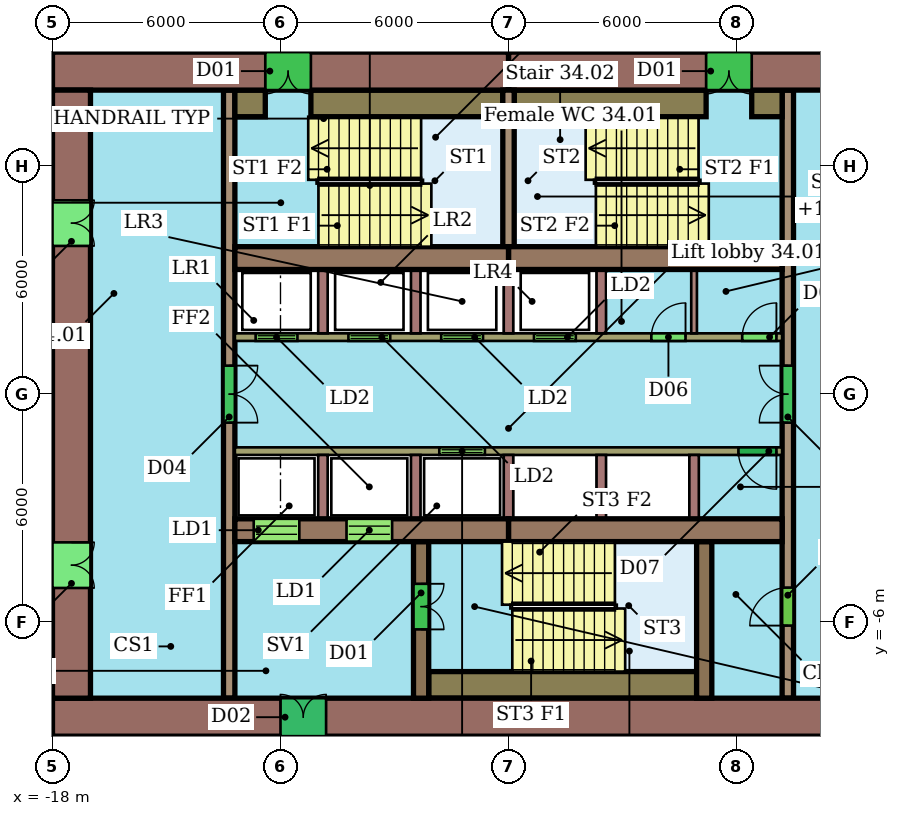
"""IFC4 building model, lengths in metres.
Left out: names, types, materials, properties, quantities, classifications, styles, units other than length and angle.
Written with IfcOpenShell. Run it as: python <this file> out.ifc"""

import sys

from ifc_helpers import new_model, si_unit, direction, frame, frame_2d, origin, place, context, subcontext, project, spatial, rectangle, extrude, element, fill, save


model = new_model("IFC4")
c1 = context("Model", 3, precision=1e-05, world=origin(), true_north=direction((0.0, 1.0)))
c2 = subcontext(c1, "Body", "Model", "MODEL_VIEW")
j1 = project(units=[si_unit("LENGTHUNIT", "METRE"), si_unit("PLANEANGLEUNIT", "RADIAN")], contexts=[c1])
p1 = place(None, origin())
s1 = spatial("IfcSite", under=j1, at=p1, CompositionType="ELEMENT")
p2 = place(p1, origin())
s2 = spatial("IfcBuilding", under=s1, at=p2, CompositionType="ELEMENT")
p3 = place(p2, frame((0.0, 0.0, 147.0)))
s3 = spatial("IfcBuildingStorey", under=s2, at=p3, CompositionType="ELEMENT", Elevation=147.0)
p4 = place(p3, frame((6.0, 8.5, 0.0), z_axis=(0.0, 0.0, 1.0), x_axis=(-1.0, 0.0, 0.0)))
e1 = element("IfcWall", 1, at=p4, inside=s3, PredefinedType="SHEAR", context=c2, shape_type="SweptSolid", body=[
    extrude(rectangle(XDim=12.0, YDim=1.0, at=frame_2d((6.0, 0.0))), origin(), (0.0, 0.0, 1.0), 3.3),
])
p5 = place(p4, frame((5.6, 0.0, 0.0)))
e2 = element("IfcOpeningElement", 2, at=p5, cuts=e1, PredefinedType="OPENING", context=c2, shape_type="SweptSolid", body=[
    extrude(rectangle(XDim=1.2, YDim=2.1, at=frame_2d((0.6, 1.05))), frame((0.0, 0.51, 0.0), z_axis=(0.0, -1.0, 0.0), x_axis=(1.0, 0.0, 0.0)), (0.0, 0.0, 1.0), 1.02),
])
p6 = place(p3, frame((-6.0, 8.5, 0.0), z_axis=(0.0, 0.0, 1.0), x_axis=(-1.0, 0.0, 0.0)))
e3 = element("IfcWall", 3, at=p6, inside=s3, PredefinedType="SHEAR", context=c2, shape_type="SweptSolid", body=[
    extrude(rectangle(XDim=12.0, YDim=1.0, at=frame_2d((6.0, 0.0))), origin(), (0.0, 0.0, 1.0), 3.3),
])
p7 = place(p6, frame((5.2, 0.0, 0.0)))
e4 = element("IfcOpeningElement", 4, at=p7, cuts=e3, PredefinedType="OPENING", context=c2, shape_type="SweptSolid", body=[
    extrude(rectangle(XDim=1.2, YDim=2.1, at=frame_2d((0.6, 1.05))), frame((0.0, 0.51, 0.0), z_axis=(0.0, -1.0, 0.0), x_axis=(1.0, 0.0, 0.0)), (0.0, 0.0, 1.0), 1.02),
])
p8 = place(p3, frame((-18.0, -8.5, 0.0), z_axis=(0.0, 0.0, 1.0), x_axis=(1.0, 0.0, 0.0)))
e5 = element("IfcWall", 5, at=p8, inside=s3, PredefinedType="SHEAR", context=c2, shape_type="SweptSolid", body=[
    extrude(rectangle(XDim=24.0, YDim=1.0, at=frame_2d((12.0, 0.0))), origin(), (0.0, 0.0, 1.0), 3.3),
])
p9 = place(p8, frame((6.0, 0.0, 0.0)))
e6 = element("IfcOpeningElement", 6, at=p9, cuts=e5, PredefinedType="OPENING", context=c2, shape_type="SweptSolid", body=[
    extrude(rectangle(XDim=1.2, YDim=2.1, at=frame_2d((0.6, 1.05))), frame((0.0, 0.51, 0.0), z_axis=(0.0, -1.0, 0.0), x_axis=(1.0, 0.0, 0.0)), (0.0, 0.0, 1.0), 1.02),
])
p10 = place(p3, frame((-17.5, 8.0, 0.0), z_axis=(0.0, 0.0, 1.0), x_axis=(0.0, -1.0, 0.0)))
e7 = element("IfcWall", 7, at=p10, inside=s3, PredefinedType="SHEAR", context=c2, shape_type="SweptSolid", body=[
    extrude(rectangle(XDim=16.0, YDim=1.0, at=frame_2d((8.0, 0.0))), origin(), (0.0, 0.0, 1.0), 3.3),
])
p11 = place(p10, frame((11.9, 0.0, 0.0)))
e8 = element("IfcOpeningElement", 8, at=p11, cuts=e7, PredefinedType="OPENING", context=c2, shape_type="SweptSolid", body=[
    extrude(rectangle(XDim=1.2, YDim=2.1, at=frame_2d((0.6, 1.05))), frame((0.0, 0.51, 0.0), z_axis=(0.0, -1.0, 0.0), x_axis=(1.0, 0.0, 0.0)), (0.0, 0.0, 1.0), 1.02),
])
p12 = place(p10, frame((2.9, 0.0, 0.0)))
e9 = element("IfcOpeningElement", 9, at=p12, cuts=e7, PredefinedType="OPENING", context=c2, shape_type="SweptSolid", body=[
    extrude(rectangle(XDim=1.2, YDim=2.1, at=frame_2d((0.6, 1.05))), frame((0.0, 0.51, 0.0), z_axis=(0.0, -1.0, 0.0), x_axis=(1.0, 0.0, 0.0)), (0.0, 0.0, 1.0), 1.02),
])
for number, where, z_axis, x_axis in (
    (10, (-13.2, 3.58, 0.0), (0.0, 0.0, 1.0), (1.0, 0.0, 0.0)),
    (11, (-6.0, 3.58, 0.0), (0.0, 0.0, 1.0), (1.0, 0.0, 0.0)),
):
    element("IfcWall", number, at=place(p3, frame(where, z_axis=z_axis, x_axis=x_axis)), inside=s3, PredefinedType="SHEAR", context=c2, shape_type="SweptSolid", body=[
        extrude(rectangle(XDim=7.2, YDim=0.6, at=frame_2d((3.6, 0.0))), origin(), (0.0, 0.0, 1.0), 3.3),
    ])
p13 = place(p3, frame((-13.2, -3.58, 0.0), z_axis=(0.0, 0.0, 1.0), x_axis=(1.0, 0.0, 0.0)))
e12 = element("IfcWall", 12, at=p13, inside=s3, PredefinedType="SHEAR", context=c2, shape_type="SweptSolid", body=[
    extrude(rectangle(XDim=7.2, YDim=0.6, at=frame_2d((3.6, 0.0))), origin(), (0.0, 0.0, 1.0), 3.3),
])
p14 = place(p13, frame((0.496, 0.0, 0.0)))
e13 = element("IfcOpeningElement", 13, at=p14, cuts=e12, PredefinedType="OPENING", context=c2, shape_type="SweptSolid", body=[
    extrude(rectangle(XDim=1.2, YDim=2.1, at=frame_2d((0.6, 1.05))), frame((0.0, 0.31, 0.0), z_axis=(0.0, -1.0, 0.0), x_axis=(1.0, 0.0, 0.0)), (0.0, 0.0, 1.0), 0.62),
])
p15 = place(p13, frame((2.938, 0.0, 0.0)))
e14 = element("IfcOpeningElement", 14, at=p15, cuts=e12, PredefinedType="OPENING", context=c2, shape_type="SweptSolid", body=[
    extrude(rectangle(XDim=1.2, YDim=2.1, at=frame_2d((0.6, 1.05))), frame((0.0, 0.31, 0.0), z_axis=(0.0, -1.0, 0.0), x_axis=(1.0, 0.0, 0.0)), (0.0, 0.0, 1.0), 0.62),
])
p16 = place(p3, frame((-6.0, -3.58, 0.0), z_axis=(0.0, 0.0, 1.0), x_axis=(1.0, 0.0, 0.0)))
e15 = element("IfcWall", 15, at=p16, inside=s3, PredefinedType="SHEAR", context=c2, shape_type="SweptSolid", body=[
    extrude(rectangle(XDim=7.2, YDim=0.6, at=frame_2d((3.6, 0.0))), origin(), (0.0, 0.0, 1.0), 3.3),
])
p17 = place(p3, frame((-13.35, 8.0, 0.0), z_axis=(0.0, 0.0, 1.0), x_axis=(0.0, -1.0, 0.0)))
e16 = element("IfcWall", 16, at=p17, inside=s3, PredefinedType="SHEAR", context=c2, shape_type="SweptSolid", body=[
    extrude(rectangle(XDim=16.0, YDim=0.3, at=frame_2d((8.0, 0.0))), origin(), (0.0, 0.0, 1.0), 3.3),
])
p18 = place(p17, frame((7.25, 0.0, 0.0)))
e17 = element("IfcOpeningElement", 17, at=p18, cuts=e16, PredefinedType="OPENING", context=c2, shape_type="SweptSolid", body=[
    extrude(rectangle(XDim=1.5, YDim=2.1, at=frame_2d((0.75, 1.05))), frame((0.0, 0.16, 0.0), z_axis=(0.0, -1.0, 0.0), x_axis=(1.0, 0.0, 0.0)), (0.0, 0.0, 1.0), 0.32),
])
p19 = place(p3, frame((1.35, -8.0, 0.0), z_axis=(0.0, 0.0, 1.0), x_axis=(0.0, 1.0, 0.0)))
e18 = element("IfcWall", 18, at=p19, inside=s3, PredefinedType="SHEAR", context=c2, shape_type="SweptSolid", body=[
    extrude(rectangle(XDim=16.0, YDim=0.3, at=frame_2d((8.0, 0.0))), origin(), (0.0, 0.0, 1.0), 3.3),
])
p20 = place(p19, frame((1.91, 0.0, 0.0)))
e19 = element("IfcOpeningElement", 19, at=p20, cuts=e18, PredefinedType="OPENING", context=c2, shape_type="SweptSolid", body=[
    extrude(rectangle(XDim=1.0, YDim=2.1, at=frame_2d((0.5, 1.05))), frame((0.0, 0.16, 0.0), z_axis=(0.0, -1.0, 0.0), x_axis=(1.0, 0.0, 0.0)), (0.0, 0.0, 1.0), 0.32),
])
p21 = place(p19, frame((7.25, 0.0, 0.0)))
e20 = element("IfcOpeningElement", 20, at=p21, cuts=e18, PredefinedType="OPENING", context=c2, shape_type="SweptSolid", body=[
    extrude(rectangle(XDim=1.5, YDim=2.1, at=frame_2d((0.75, 1.05))), frame((0.0, 0.16, 0.0), z_axis=(0.0, -1.0, 0.0), x_axis=(1.0, 0.0, 0.0)), (0.0, 0.0, 1.0), 0.32),
])
p22 = place(p3, frame((-13.2, 1.5, 0.0), z_axis=(0.0, 0.0, 1.0), x_axis=(1.0, 0.0, 0.0)))
e21 = element("IfcWall", 21, at=p22, inside=s3, PredefinedType="SHEAR", context=c2, shape_type="SweptSolid", body=[
    extrude(rectangle(XDim=14.4, YDim=0.2, at=frame_2d((7.2, 0.0))), origin(), (0.0, 0.0, 1.0), 3.3),
])
p23 = place(p22, frame((0.546, 0.0, 0.0)))
e22 = element("IfcOpeningElement", 22, at=p23, cuts=e21, PredefinedType="OPENING", context=c2, shape_type="SweptSolid", body=[
    extrude(rectangle(XDim=1.1, YDim=2.1, at=frame_2d((0.55, 1.05))), frame((0.0, 0.11, 0.0), z_axis=(0.0, -1.0, 0.0), x_axis=(1.0, 0.0, 0.0)), (0.0, 0.0, 1.0), 0.22),
])
p24 = place(p22, frame((2.988, 0.0, 0.0)))
e23 = element("IfcOpeningElement", 23, at=p24, cuts=e21, PredefinedType="OPENING", context=c2, shape_type="SweptSolid", body=[
    extrude(rectangle(XDim=1.1, YDim=2.1, at=frame_2d((0.55, 1.05))), frame((0.0, 0.11, 0.0), z_axis=(0.0, -1.0, 0.0), x_axis=(1.0, 0.0, 0.0)), (0.0, 0.0, 1.0), 0.22),
])
p25 = place(p22, frame((5.429, 0.0, 0.0)))
e24 = element("IfcOpeningElement", 24, at=p25, cuts=e21, PredefinedType="OPENING", context=c2, shape_type="SweptSolid", body=[
    extrude(rectangle(XDim=1.1, YDim=2.1, at=frame_2d((0.55, 1.05))), frame((0.0, 0.11, 0.0), z_axis=(0.0, -1.0, 0.0), x_axis=(1.0, 0.0, 0.0)), (0.0, 0.0, 1.0), 0.22),
])
p26 = place(p22, frame((7.871, 0.0, 0.0)))
e25 = element("IfcOpeningElement", 25, at=p26, cuts=e21, PredefinedType="OPENING", context=c2, shape_type="SweptSolid", body=[
    extrude(rectangle(XDim=1.1, YDim=2.1, at=frame_2d((0.55, 1.05))), frame((0.0, 0.11, 0.0), z_axis=(0.0, -1.0, 0.0), x_axis=(1.0, 0.0, 0.0)), (0.0, 0.0, 1.0), 0.22),
])
p27 = place(p22, frame((10.958, 0.0, 0.0)))
e26 = element("IfcOpeningElement", 26, at=p27, cuts=e21, PredefinedType="OPENING", context=c2, shape_type="SweptSolid", body=[
    extrude(rectangle(XDim=0.9, YDim=2.1, at=frame_2d((0.45, 1.05))), frame((0.0, 0.11, 0.0), z_axis=(0.0, -1.0, 0.0), x_axis=(1.0, 0.0, 0.0)), (0.0, 0.0, 1.0), 0.22),
])
p28 = place(p22, frame((13.35, 0.0, 0.0)))
e27 = element("IfcOpeningElement", 27, at=p28, cuts=e21, PredefinedType="OPENING", context=c2, shape_type="SweptSolid", body=[
    extrude(rectangle(XDim=0.9, YDim=2.1, at=frame_2d((0.45, 1.05))), frame((0.0, 0.11, 0.0), z_axis=(0.0, -1.0, 0.0), x_axis=(1.0, 0.0, 0.0)), (0.0, 0.0, 1.0), 0.22),
])
p29 = place(p3, frame((1.2, -1.5, 0.0), z_axis=(0.0, 0.0, 1.0), x_axis=(-1.0, 0.0, 0.0)))
e28 = element("IfcWall", 28, at=p29, inside=s3, PredefinedType="SHEAR", context=c2, shape_type="SweptSolid", body=[
    extrude(rectangle(XDim=14.4, YDim=0.2, at=frame_2d((7.2, 0.0))), origin(), (0.0, 0.0, 1.0), 3.3),
])
p30 = place(p29, frame((7.821, 0.0, 0.0)))
e29 = element("IfcOpeningElement", 29, at=p30, cuts=e28, PredefinedType="OPENING", context=c2, shape_type="SweptSolid", body=[
    extrude(rectangle(XDim=1.2, YDim=2.1, at=frame_2d((0.6, 1.05))), frame((0.0, 0.11, 0.0), z_axis=(0.0, -1.0, 0.0), x_axis=(1.0, 0.0, 0.0)), (0.0, 0.0, 1.0), 0.22),
])
p31 = place(p29, frame((0.15, 0.0, 0.0)))
e30 = element("IfcOpeningElement", 30, at=p31, cuts=e28, PredefinedType="OPENING", context=c2, shape_type="SweptSolid", body=[
    extrude(rectangle(XDim=1.0, YDim=2.1, at=frame_2d((0.5, 1.05))), frame((0.0, 0.11, 0.0), z_axis=(0.0, -1.0, 0.0), x_axis=(1.0, 0.0, 0.0)), (0.0, 0.0, 1.0), 0.22),
])
p32 = place(p3, frame((-8.3, -3.88, 0.0), z_axis=(0.0, 0.0, 1.0), x_axis=(0.0, -1.0, 0.0)))
e31 = element("IfcWall", 31, at=p32, inside=s3, PredefinedType="SHEAR", context=c2, shape_type="SweptSolid", body=[
    extrude(rectangle(XDim=4.12, YDim=0.4, at=frame_2d((2.06, 0.0))), origin(), (0.0, 0.0, 1.0), 3.3),
])
p33 = place(p32, frame((1.11, 0.0, 0.0)))
e32 = element("IfcOpeningElement", 32, at=p33, cuts=e31, PredefinedType="OPENING", context=c2, shape_type="SweptSolid", body=[
    extrude(rectangle(XDim=1.2, YDim=2.1, at=frame_2d((0.6, 1.05))), frame((0.0, 0.21, 0.0), z_axis=(0.0, -1.0, 0.0), x_axis=(1.0, 0.0, 0.0)), (0.0, 0.0, 1.0), 0.42),
])
p34 = place(p3, frame((-0.85, -3.88, 0.0), z_axis=(0.0, 0.0, 1.0), x_axis=(0.0, -1.0, 0.0)))
e33 = element("IfcWall", 33, at=p34, inside=s3, PredefinedType="SHEAR", context=c2, shape_type="SweptSolid", body=[
    extrude(rectangle(XDim=4.12, YDim=0.4, at=frame_2d((2.06, 0.0))), origin(), (0.0, 0.0, 1.0), 3.3),
])
p35 = place(p3, frame((-6.0, 3.88, 0.0), z_axis=(0.0, 0.0, 1.0), x_axis=(0.0, 1.0, 0.0)))
e34 = element("IfcWall", 34, at=p35, inside=s3, PredefinedType="SHEAR", context=c2, shape_type="SweptSolid", body=[
    extrude(rectangle(XDim=4.12, YDim=0.3, at=frame_2d((2.06, 0.0))), origin(), (0.0, 0.0, 1.0), 3.3),
])
p36 = place(p3, frame((-13.2, 7.65, 0.0), z_axis=(0.0, 0.0, 1.0), x_axis=(1.0, 0.0, 0.0)))
e35 = element("IfcWall", 35, at=p36, inside=s3, PredefinedType="SHEAR", context=c2, shape_type="SweptSolid", body=[
    extrude(rectangle(XDim=0.8, YDim=0.7, at=frame_2d((0.4, 0.0))), origin(), (0.0, 0.0, 1.0), 3.3),
])
for number, where, z_axis, x_axis in (
    (36, (-11.2, 7.65, 0.0), (0.0, 0.0, 1.0), (1.0, 0.0, 0.0)),
    (37, (-5.85, 7.65, 0.0), (0.0, 0.0, 1.0), (1.0, 0.0, 0.0)),
):
    element("IfcWall", number, at=place(p3, frame(where, z_axis=z_axis, x_axis=x_axis)), inside=s3, PredefinedType="SHEAR", context=c2, shape_type="SweptSolid", body=[
        extrude(rectangle(XDim=5.05, YDim=0.7, at=frame_2d((2.525, 0.0))), origin(), (0.0, 0.0, 1.0), 3.3),
    ])
p37 = place(p3, frame((0.4, 7.65, 0.0), z_axis=(0.0, 0.0, 1.0), x_axis=(1.0, 0.0, 0.0)))
e38 = element("IfcWall", 38, at=p37, inside=s3, PredefinedType="SHEAR", context=c2, shape_type="SweptSolid", body=[
    extrude(rectangle(XDim=0.8, YDim=0.7, at=frame_2d((0.4, 0.0))), origin(), (0.0, 0.0, 1.0), 3.3),
])
p38 = place(p3, frame((-8.1, -7.65, 0.0), z_axis=(0.0, 0.0, 1.0), x_axis=(1.0, 0.0, 0.0)))
e39 = element("IfcWall", 39, at=p38, inside=s3, PredefinedType="SHEAR", context=c2, shape_type="SweptSolid", body=[
    extrude(rectangle(XDim=7.05, YDim=0.7, at=frame_2d((3.525, 0.0))), origin(), (0.0, 0.0, 1.0), 3.3),
])
for number, where, z_axis, x_axis in (
    (40, (-10.883, 1.6, 0.0), (0.0, 0.0, 1.0), (0.0, 1.0, 0.0)),
    (41, (-8.442, 1.6, 0.0), (0.0, 0.0, 1.0), (0.0, 1.0, 0.0)),
    (42, (-6.0, 1.6, 0.0), (0.0, 0.0, 1.0), (0.0, 1.0, 0.0)),
    (43, (-3.558, 1.6, 0.0), (0.0, 0.0, 1.0), (0.0, 1.0, 0.0)),
):
    element("IfcWall", number, at=place(p3, frame(where, z_axis=z_axis, x_axis=x_axis)), inside=s3, PredefinedType="SHEAR", context=c2, shape_type="SweptSolid", body=[
        extrude(rectangle(XDim=1.68, YDim=0.25, at=frame_2d((0.84, 0.0))), origin(), (0.0, 0.0, 1.0), 3.3),
    ])
p39 = place(p3, frame((-1.117, 1.6, 0.0), z_axis=(0.0, 0.0, 1.0), x_axis=(0.0, 1.0, 0.0)))
e44 = element("IfcWall", 44, at=p39, inside=s3, PredefinedType="PARTITIONING", context=c2, shape_type="SweptSolid", body=[
    extrude(rectangle(XDim=1.68, YDim=0.15, at=frame_2d((0.84, 0.0))), origin(), (0.0, 0.0, 1.0), 3.3),
])
for number, where, z_axis, x_axis in (
    (45, (-10.883, -1.6, 0.0), (0.0, 0.0, 1.0), (0.0, -1.0, 0.0)),
    (46, (-8.442, -1.6, 0.0), (0.0, 0.0, 1.0), (0.0, -1.0, 0.0)),
    (47, (-6.0, -1.6, 0.0), (0.0, 0.0, 1.0), (0.0, -1.0, 0.0)),
    (48, (-3.558, -1.6, 0.0), (0.0, 0.0, 1.0), (0.0, -1.0, 0.0)),
    (49, (-1.117, -1.6, 0.0), (0.0, 0.0, 1.0), (0.0, -1.0, 0.0)),
):
    element("IfcWall", number, at=place(p3, frame(where, z_axis=z_axis, x_axis=x_axis)), inside=s3, PredefinedType="SHEAR", context=c2, shape_type="SweptSolid", body=[
        extrude(rectangle(XDim=1.68, YDim=0.25, at=frame_2d((0.84, 0.0))), origin(), (0.0, 0.0, 1.0), 3.3),
    ])
p40 = place(p5, origin())
e50 = element("IfcDoor", 50, at=p40, inside=s3, OperationType="DOUBLE_DOOR_SINGLE_SWING", PredefinedType="NOTDEFINED", context=c2, shape_type="SweptSolid", body=[
    extrude(rectangle(XDim=1.2, YDim=2.1, at=frame_2d((0.6, 1.05))), frame((0.0, 0.025, 0.0), z_axis=(0.0, -1.0, 0.0), x_axis=(1.0, 0.0, 0.0)), (0.0, 0.0, 1.0), 0.05),
])
fill(e2, e50)
p41 = place(p7, origin())
e51 = element("IfcDoor", 51, at=p41, inside=s3, OperationType="DOUBLE_DOOR_SINGLE_SWING", PredefinedType="NOTDEFINED", context=c2, shape_type="SweptSolid", body=[
    extrude(rectangle(XDim=1.2, YDim=2.1, at=frame_2d((0.6, 1.05))), frame((0.0, 0.025, 0.0), z_axis=(0.0, -1.0, 0.0), x_axis=(1.0, 0.0, 0.0)), (0.0, 0.0, 1.0), 0.05),
])
fill(e4, e51)
p42 = place(p9, origin())
e52 = element("IfcDoor", 52, at=p42, inside=s3, OperationType="DOUBLE_DOOR_SINGLE_SWING", PredefinedType="NOTDEFINED", context=c2, shape_type="SweptSolid", body=[
    extrude(rectangle(XDim=1.2, YDim=2.1, at=frame_2d((0.6, 1.05))), frame((0.0, 0.025, 0.0), z_axis=(0.0, -1.0, 0.0), x_axis=(1.0, 0.0, 0.0)), (0.0, 0.0, 1.0), 0.05),
])
fill(e6, e52)
p43 = place(p11, origin())
e53 = element("IfcDoor", 53, at=p43, inside=s3, OperationType="DOUBLE_DOOR_SINGLE_SWING", PredefinedType="NOTDEFINED", context=c2, shape_type="SweptSolid", body=[
    extrude(rectangle(XDim=1.2, YDim=2.1, at=frame_2d((0.6, 1.05))), frame((0.0, 0.025, 0.0), z_axis=(0.0, -1.0, 0.0), x_axis=(1.0, 0.0, 0.0)), (0.0, 0.0, 1.0), 0.05),
])
fill(e8, e53)
p44 = place(p12, origin())
e54 = element("IfcDoor", 54, at=p44, inside=s3, OperationType="DOUBLE_DOOR_SINGLE_SWING", PredefinedType="NOTDEFINED", context=c2, shape_type="SweptSolid", body=[
    extrude(rectangle(XDim=1.2, YDim=2.1, at=frame_2d((0.6, 1.05))), frame((0.0, 0.025, 0.0), z_axis=(0.0, -1.0, 0.0), x_axis=(1.0, 0.0, 0.0)), (0.0, 0.0, 1.0), 0.05),
])
fill(e9, e54)
p45 = place(p14, origin())
e55 = element("IfcDoor", 55, at=p45, inside=s3, OperationType="DOUBLE_DOOR_SLIDING", PredefinedType="NOTDEFINED", context=c2, shape_type="SweptSolid", body=[
    extrude(rectangle(XDim=1.2, YDim=2.1, at=frame_2d((0.6, 1.05))), frame((0.0, 0.025, 0.0), z_axis=(0.0, -1.0, 0.0), x_axis=(1.0, 0.0, 0.0)), (0.0, 0.0, 1.0), 0.05),
])
fill(e13, e55)
p46 = place(p15, origin())
e56 = element("IfcDoor", 56, at=p46, inside=s3, OperationType="DOUBLE_DOOR_SLIDING", PredefinedType="NOTDEFINED", context=c2, shape_type="SweptSolid", body=[
    extrude(rectangle(XDim=1.2, YDim=2.1, at=frame_2d((0.6, 1.05))), frame((0.0, 0.025, 0.0), z_axis=(0.0, -1.0, 0.0), x_axis=(1.0, 0.0, 0.0)), (0.0, 0.0, 1.0), 0.05),
])
fill(e14, e56)
p47 = place(p18, origin())
e57 = element("IfcDoor", 57, at=p47, inside=s3, OperationType="DOUBLE_DOOR_SINGLE_SWING", PredefinedType="NOTDEFINED", context=c2, shape_type="SweptSolid", body=[
    extrude(rectangle(XDim=1.5, YDim=2.1, at=frame_2d((0.75, 1.05))), frame((0.0, 0.025, 0.0), z_axis=(0.0, -1.0, 0.0), x_axis=(1.0, 0.0, 0.0)), (0.0, 0.0, 1.0), 0.05),
])
fill(e17, e57)
p48 = place(p20, origin())
e58 = element("IfcDoor", 58, at=p48, inside=s3, OperationType="SINGLE_SWING_LEFT", PredefinedType="NOTDEFINED", context=c2, shape_type="SweptSolid", body=[
    extrude(rectangle(XDim=1.0, YDim=2.1, at=frame_2d((0.5, 1.05))), frame((0.0, 0.025, 0.0), z_axis=(0.0, -1.0, 0.0), x_axis=(1.0, 0.0, 0.0)), (0.0, 0.0, 1.0), 0.05),
])
fill(e19, e58)
p49 = place(p21, origin())
e59 = element("IfcDoor", 59, at=p49, inside=s3, OperationType="DOUBLE_DOOR_SINGLE_SWING", PredefinedType="NOTDEFINED", context=c2, shape_type="SweptSolid", body=[
    extrude(rectangle(XDim=1.5, YDim=2.1, at=frame_2d((0.75, 1.05))), frame((0.0, 0.025, 0.0), z_axis=(0.0, -1.0, 0.0), x_axis=(1.0, 0.0, 0.0)), (0.0, 0.0, 1.0), 0.05),
])
fill(e20, e59)
p50 = place(p23, origin())
e60 = element("IfcDoor", 60, at=p50, inside=s3, OperationType="DOUBLE_DOOR_SLIDING", PredefinedType="NOTDEFINED", context=c2, shape_type="SweptSolid", body=[
    extrude(rectangle(XDim=1.1, YDim=2.1, at=frame_2d((0.55, 1.05))), frame((0.0, 0.025, 0.0), z_axis=(0.0, -1.0, 0.0), x_axis=(1.0, 0.0, 0.0)), (0.0, 0.0, 1.0), 0.05),
])
fill(e22, e60)
p51 = place(p24, origin())
e61 = element("IfcDoor", 61, at=p51, inside=s3, OperationType="DOUBLE_DOOR_SLIDING", PredefinedType="NOTDEFINED", context=c2, shape_type="SweptSolid", body=[
    extrude(rectangle(XDim=1.1, YDim=2.1, at=frame_2d((0.55, 1.05))), frame((0.0, 0.025, 0.0), z_axis=(0.0, -1.0, 0.0), x_axis=(1.0, 0.0, 0.0)), (0.0, 0.0, 1.0), 0.05),
])
fill(e23, e61)
p52 = place(p25, origin())
e62 = element("IfcDoor", 62, at=p52, inside=s3, OperationType="DOUBLE_DOOR_SLIDING", PredefinedType="NOTDEFINED", context=c2, shape_type="SweptSolid", body=[
    extrude(rectangle(XDim=1.1, YDim=2.1, at=frame_2d((0.55, 1.05))), frame((0.0, 0.025, 0.0), z_axis=(0.0, -1.0, 0.0), x_axis=(1.0, 0.0, 0.0)), (0.0, 0.0, 1.0), 0.05),
])
fill(e24, e62)
p53 = place(p26, origin())
e63 = element("IfcDoor", 63, at=p53, inside=s3, OperationType="DOUBLE_DOOR_SLIDING", PredefinedType="NOTDEFINED", context=c2, shape_type="SweptSolid", body=[
    extrude(rectangle(XDim=1.1, YDim=2.1, at=frame_2d((0.55, 1.05))), frame((0.0, 0.025, 0.0), z_axis=(0.0, -1.0, 0.0), x_axis=(1.0, 0.0, 0.0)), (0.0, 0.0, 1.0), 0.05),
])
fill(e25, e63)
p54 = place(p27, origin())
e64 = element("IfcDoor", 64, at=p54, inside=s3, OperationType="SINGLE_SWING_RIGHT", PredefinedType="NOTDEFINED", context=c2, shape_type="SweptSolid", body=[
    extrude(rectangle(XDim=0.9, YDim=2.1, at=frame_2d((0.45, 1.05))), frame((0.0, 0.025, 0.0), z_axis=(0.0, -1.0, 0.0), x_axis=(1.0, 0.0, 0.0)), (0.0, 0.0, 1.0), 0.05),
])
fill(e26, e64)
p55 = place(p28, origin())
e65 = element("IfcDoor", 65, at=p55, inside=s3, OperationType="SINGLE_SWING_RIGHT", PredefinedType="NOTDEFINED", context=c2, shape_type="SweptSolid", body=[
    extrude(rectangle(XDim=0.9, YDim=2.1, at=frame_2d((0.45, 1.05))), frame((0.0, 0.025, 0.0), z_axis=(0.0, -1.0, 0.0), x_axis=(1.0, 0.0, 0.0)), (0.0, 0.0, 1.0), 0.05),
])
fill(e27, e65)
p56 = place(p30, origin())
e66 = element("IfcDoor", 66, at=p56, inside=s3, OperationType="DOUBLE_DOOR_SLIDING", PredefinedType="NOTDEFINED", context=c2, shape_type="SweptSolid", body=[
    extrude(rectangle(XDim=1.2, YDim=2.1, at=frame_2d((0.6, 1.05))), frame((0.0, 0.025, 0.0), z_axis=(0.0, -1.0, 0.0), x_axis=(1.0, 0.0, 0.0)), (0.0, 0.0, 1.0), 0.05),
])
fill(e29, e66)
p57 = place(p31, origin())
e67 = element("IfcDoor", 67, at=p57, inside=s3, OperationType="SINGLE_SWING_LEFT", PredefinedType="NOTDEFINED", context=c2, shape_type="SweptSolid", body=[
    extrude(rectangle(XDim=1.0, YDim=2.1, at=frame_2d((0.5, 1.05))), frame((0.0, 0.025, 0.0), z_axis=(0.0, -1.0, 0.0), x_axis=(1.0, 0.0, 0.0)), (0.0, 0.0, 1.0), 0.05),
])
fill(e30, e67)
p58 = place(p33, origin())
e68 = element("IfcDoor", 68, at=p58, inside=s3, OperationType="DOUBLE_DOOR_SINGLE_SWING", PredefinedType="NOTDEFINED", context=c2, shape_type="SweptSolid", body=[
    extrude(rectangle(XDim=1.2, YDim=2.1, at=frame_2d((0.6, 1.05))), frame((0.0, 0.025, 0.0), z_axis=(0.0, -1.0, 0.0), x_axis=(1.0, 0.0, 0.0)), (0.0, 0.0, 1.0), 0.05),
])
fill(e32, e68)
save(model, sys.argv[1])
